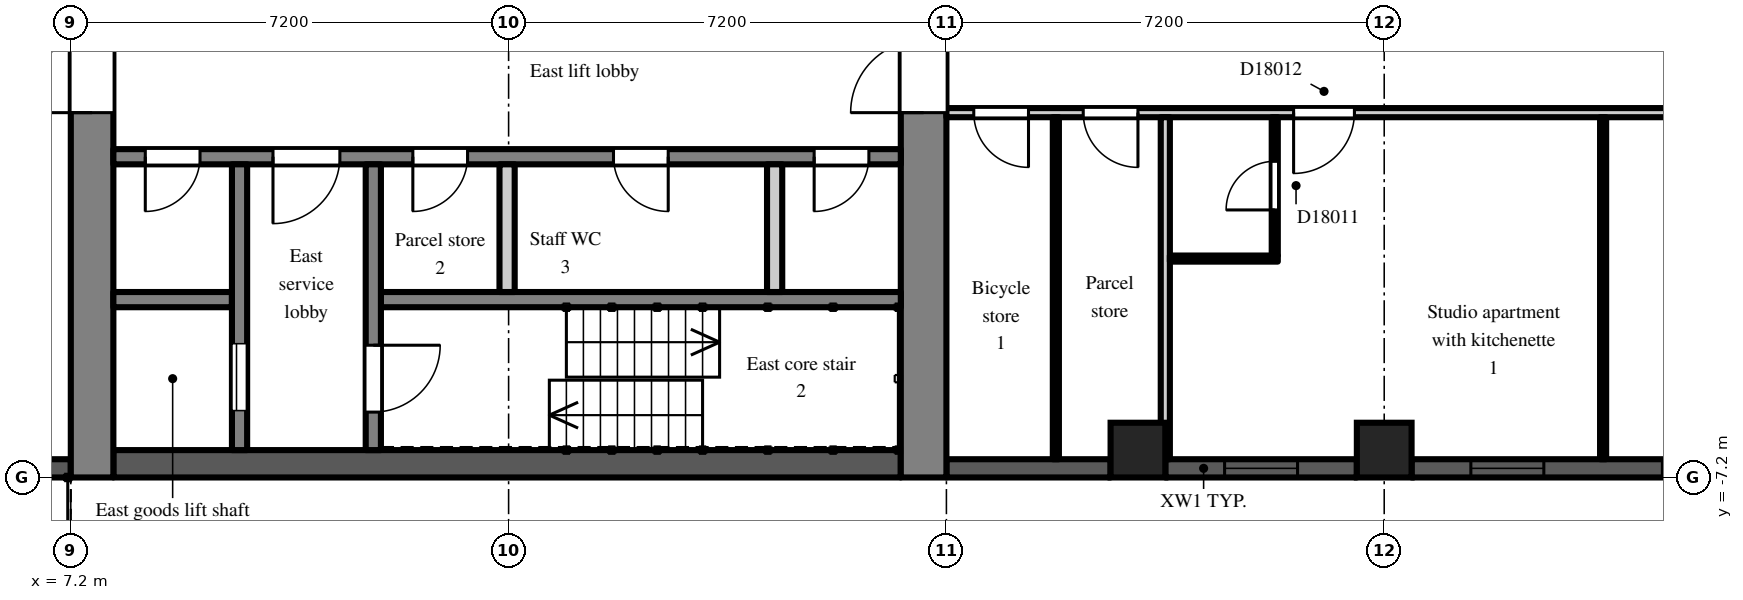
"""IFC4 building model, lengths in metres.
Left out: names, types, materials, properties, quantities, classifications, styles, units other than length and angle.
Written with IfcOpenShell. Run it as: python <this file> out.ifc"""

import sys

from ifc_helpers import new_model, si_unit, direction, frame, frame_2d, origin, origin_2d, place, context, subcontext, project, spatial, rectangle, extrude, element, fill, save


model = new_model("IFC4")
c1 = context("Model", 3, precision=1e-05, world=origin(), true_north=direction((0.0, 1.0)))
c2 = subcontext(c1, "Body", "Model", "MODEL_VIEW")
j1 = project(units=[si_unit("LENGTHUNIT", "METRE"), si_unit("PLANEANGLEUNIT", "RADIAN")], contexts=[c1])
p1 = place(None, origin())
s1 = spatial("IfcSite", under=j1, at=p1, CompositionType="ELEMENT")
p2 = place(p1, origin())
s2 = spatial("IfcBuilding", under=s1, at=p2, CompositionType="ELEMENT")
p3 = place(p2, frame((0.0, 0.0, 123.3)))
s3 = spatial("IfcBuildingStorey", under=s2, at=p3, CompositionType="ELEMENT", Elevation=123.3)
for number, where, z_axis, x_axis in (
    (1, (24.75, -6.75, 0.0), (0.0, 0.0, 1.0), (1.0, 0.0, 0.0)),
    (2, (28.8, -6.75, 0.0), (0.0, 0.0, 1.0), (1.0, 0.0, 0.0)),
):
    element("IfcColumn", number, at=place(p3, frame(where, z_axis=z_axis, x_axis=x_axis)), inside=s3, PredefinedType="COLUMN", context=c2, shape_type="SweptSolid", body=[
        extrude(rectangle(XDim=0.9, YDim=0.9, at=origin_2d()), origin(), (0.0, 0.0, 1.0), 3.0),
    ])
p4 = place(p3, frame((21.6, -7.05, 0.0), z_axis=(0.0, 0.0, 1.0), x_axis=(1.0, 0.0, 0.0)))
e3 = element("IfcWall", 3, at=p4, inside=s3, PredefinedType="SOLIDWALL", context=c2, shape_type="SweptSolid", body=[
    extrude(rectangle(XDim=2.7, YDim=0.3, at=frame_2d((1.35, 0.0))), origin(), (0.0, 0.0, 1.0), 2.2),
])
p5 = place(p3, frame((25.2, -7.05, 0.0), z_axis=(0.0, 0.0, 1.0), x_axis=(1.0, 0.0, 0.0)))
e4 = element("IfcWall", 4, at=p5, inside=s3, PredefinedType="SOLIDWALL", context=c2, shape_type="SweptSolid", body=[
    extrude(rectangle(XDim=3.15, YDim=0.3, at=frame_2d((1.575, 0.0))), origin(), (0.0, 0.0, 1.0), 2.2),
])
p6 = place(p5, frame((0.975, 0.0, 0.2)))
e5 = element("IfcOpeningElement", 5, at=p6, cuts=e4, PredefinedType="OPENING", context=c2, shape_type="SweptSolid", body=[
    extrude(rectangle(XDim=1.2, YDim=1.85, at=frame_2d((0.6, 0.925))), frame((0.0, 0.16, 0.0), z_axis=(0.0, -1.0, 0.0), x_axis=(1.0, 0.0, 0.0)), (0.0, 0.0, 1.0), 0.32),
])
p7 = place(p3, frame((29.25, -7.05, 0.0), z_axis=(0.0, 0.0, 1.0), x_axis=(1.0, 0.0, 0.0)))
e6 = element("IfcWall", 6, at=p7, inside=s3, PredefinedType="SOLIDWALL", context=c2, shape_type="SweptSolid", body=[
    extrude(rectangle(XDim=6.3, YDim=0.3, at=frame_2d((3.15, 0.0))), origin(), (0.0, 0.0, 1.0), 2.2),
])
p8 = place(p7, frame((0.975, 0.0, 0.2)))
e7 = element("IfcOpeningElement", 7, at=p8, cuts=e6, PredefinedType="OPENING", context=c2, shape_type="SweptSolid", body=[
    extrude(rectangle(XDim=1.2, YDim=1.85, at=frame_2d((0.6, 0.925))), frame((0.0, 0.16, 0.0), z_axis=(0.0, -1.0, 0.0), x_axis=(1.0, 0.0, 0.0)), (0.0, 0.0, 1.0), 0.32),
])
p9 = place(p7, frame((4.125, 0.0, 0.2)))
e8 = element("IfcOpeningElement", 8, at=p9, cuts=e6, PredefinedType="OPENING", context=c2, shape_type="SweptSolid", body=[
    extrude(rectangle(XDim=1.2, YDim=1.85, at=frame_2d((0.6, 0.925))), frame((0.0, 0.16, 0.0), z_axis=(0.0, -1.0, 0.0), x_axis=(1.0, 0.0, 0.0)), (0.0, 0.0, 1.0), 0.32),
])
p10 = place(p3, frame((4.2, -7.05, 0.0), z_axis=(0.0, 0.0, 1.0), x_axis=(1.0, 0.0, 0.0)))
e9 = element("IfcWall", 9, at=p10, inside=s3, PredefinedType="SOLIDWALL", context=c2, shape_type="SweptSolid", body=[
    extrude(rectangle(XDim=3.0, YDim=0.3, at=frame_2d((1.5, 0.0))), origin(), (0.0, 0.0, 1.0), 2.2),
])
p11 = place(p3, frame((7.55, -7.2, 0.0), z_axis=(0.0, 0.0, 1.0), x_axis=(0.0, 1.0, 0.0)))
e10 = element("IfcWall", 10, at=p11, inside=s3, PredefinedType="SHEAR", context=c2, shape_type="SweptSolid", body=[
    extrude(rectangle(XDim=14.4, YDim=0.7, at=frame_2d((7.2, 0.0))), origin(), (0.0, 0.0, 1.0), 2.6),
])
p12 = place(p11, frame((6.0, 0.0, 0.0)))
e11 = element("IfcOpeningElement", 11, at=p12, cuts=e10, PredefinedType="OPENING", context=c2, shape_type="SweptSolid", body=[
    extrude(rectangle(XDim=2.4, YDim=2.2, at=frame_2d((1.2, 1.1))), frame((0.0, 0.36, 0.0), z_axis=(0.0, -1.0, 0.0), x_axis=(1.0, 0.0, 0.0)), (0.0, 0.0, 1.0), 0.72),
])
p13 = place(p3, frame((21.225, -7.2, 0.0), z_axis=(0.0, 0.0, 1.0), x_axis=(0.0, 1.0, 0.0)))
e12 = element("IfcWall", 12, at=p13, inside=s3, PredefinedType="SHEAR", context=c2, shape_type="SweptSolid", body=[
    extrude(rectangle(XDim=14.4, YDim=0.75, at=frame_2d((7.2, 0.0))), origin(), (0.0, 0.0, 1.0), 2.6),
])
p14 = place(p13, frame((6.0, 0.0, 0.0)))
e13 = element("IfcOpeningElement", 13, at=p14, cuts=e12, PredefinedType="OPENING", context=c2, shape_type="SweptSolid", body=[
    extrude(rectangle(XDim=2.4, YDim=2.2, at=frame_2d((1.2, 1.1))), frame((0.0, 0.385, 0.0), z_axis=(0.0, -1.0, 0.0), x_axis=(1.0, 0.0, 0.0)), (0.0, 0.0, 1.0), 0.77),
])
p15 = place(p3, frame((7.9, -6.975, 0.0), z_axis=(0.0, 0.0, 1.0), x_axis=(1.0, 0.0, 0.0)))
e14 = element("IfcWall", 14, at=p15, inside=s3, PredefinedType="SHEAR", context=c2, shape_type="SweptSolid", body=[
    extrude(rectangle(XDim=12.95, YDim=0.45, at=frame_2d((6.475, 0.0))), origin(), (0.0, 0.0, 1.0), 2.6),
])
p16 = place(p3, frame((7.9, -1.925, 0.0), z_axis=(0.0, 0.0, 1.0), x_axis=(1.0, 0.0, 0.0)))
e15 = element("IfcWall", 15, at=p16, inside=s3, PredefinedType="SHEAR", context=c2, shape_type="SweptSolid", body=[
    extrude(rectangle(XDim=12.95, YDim=0.25, at=frame_2d((6.475, 0.0))), origin(), (0.0, 0.0, 1.0), 2.6),
])
p17 = place(p16, frame((0.525, 0.0, 0.0)))
e16 = element("IfcOpeningElement", 16, at=p17, cuts=e15, PredefinedType="OPENING", context=c2, shape_type="SweptSolid", body=[
    extrude(rectangle(XDim=0.9, YDim=2.1, at=frame_2d((0.45, 1.05))), frame((0.0, 0.135, 0.0), z_axis=(0.0, -1.0, 0.0), x_axis=(1.0, 0.0, 0.0)), (0.0, 0.0, 1.0), 0.27),
])
p18 = place(p16, frame((2.625, 0.0, 0.0)))
e17 = element("IfcOpeningElement", 17, at=p18, cuts=e15, PredefinedType="OPENING", context=c2, shape_type="SweptSolid", body=[
    extrude(rectangle(XDim=1.1, YDim=2.1, at=frame_2d((0.55, 1.05))), frame((0.0, 0.135, 0.0), z_axis=(0.0, -1.0, 0.0), x_axis=(1.0, 0.0, 0.0)), (0.0, 0.0, 1.0), 0.27),
])
p19 = place(p16, frame((4.925, 0.0, 0.0)))
e18 = element("IfcOpeningElement", 18, at=p19, cuts=e15, PredefinedType="OPENING", context=c2, shape_type="SweptSolid", body=[
    extrude(rectangle(XDim=0.9, YDim=2.1, at=frame_2d((0.45, 1.05))), frame((0.0, 0.135, 0.0), z_axis=(0.0, -1.0, 0.0), x_axis=(1.0, 0.0, 0.0)), (0.0, 0.0, 1.0), 0.27),
])
p20 = place(p16, frame((8.225, 0.0, 0.0)))
e19 = element("IfcOpeningElement", 19, at=p20, cuts=e15, PredefinedType="OPENING", context=c2, shape_type="SweptSolid", body=[
    extrude(rectangle(XDim=0.9, YDim=2.1, at=frame_2d((0.45, 1.05))), frame((0.0, 0.135, 0.0), z_axis=(0.0, -1.0, 0.0), x_axis=(1.0, 0.0, 0.0)), (0.0, 0.0, 1.0), 0.27),
])
p21 = place(p16, frame((11.525, 0.0, 0.0)))
e20 = element("IfcOpeningElement", 20, at=p21, cuts=e15, PredefinedType="OPENING", context=c2, shape_type="SweptSolid", body=[
    extrude(rectangle(XDim=0.9, YDim=2.1, at=frame_2d((0.45, 1.05))), frame((0.0, 0.135, 0.0), z_axis=(0.0, -1.0, 0.0), x_axis=(1.0, 0.0, 0.0)), (0.0, 0.0, 1.0), 0.27),
])
p22 = place(p3, frame((7.9, -4.275, 0.0), z_axis=(0.0, 0.0, 1.0), x_axis=(1.0, 0.0, 0.0)))
e21 = element("IfcWall", 21, at=p22, inside=s3, PredefinedType="SHEAR", context=c2, shape_type="SweptSolid", body=[
    extrude(rectangle(XDim=1.95, YDim=0.25, at=frame_2d((0.975, 0.0))), origin(), (0.0, 0.0, 1.0), 2.6),
])
p23 = place(p3, frame((12.3, -4.275, 0.0), z_axis=(0.0, 0.0, 1.0), x_axis=(1.0, 0.0, 0.0)))
e22 = element("IfcWall", 22, at=p23, inside=s3, PredefinedType="SHEAR", context=c2, shape_type="SweptSolid", body=[
    extrude(rectangle(XDim=8.55, YDim=0.25, at=frame_2d((4.275, 0.0))), origin(), (0.0, 0.0, 1.0), 2.6),
])
p24 = place(p3, frame((9.975, -2.05, 0.0), z_axis=(0.0, 0.0, 1.0), x_axis=(0.0, -1.0, 0.0)))
e23 = element("IfcWall", 23, at=p24, inside=s3, PredefinedType="SHEAR", context=c2, shape_type="SweptSolid", body=[
    extrude(rectangle(XDim=4.7, YDim=0.25, at=frame_2d((2.35, 0.0))), origin(), (0.0, 0.0, 1.0), 2.6),
])
p25 = place(p24, frame((2.95, 0.0, 0.0)))
e24 = element("IfcOpeningElement", 24, at=p25, cuts=e23, PredefinedType="OPENING", context=c2, shape_type="SweptSolid", body=[
    extrude(rectangle(XDim=1.1, YDim=2.1, at=frame_2d((0.55, 1.05))), frame((0.0, 0.135, 0.0), z_axis=(0.0, -1.0, 0.0), x_axis=(1.0, 0.0, 0.0)), (0.0, 0.0, 1.0), 0.27),
])
p26 = place(p3, frame((12.175, -2.05, 0.0), z_axis=(0.0, 0.0, 1.0), x_axis=(0.0, -1.0, 0.0)))
e25 = element("IfcWall", 25, at=p26, inside=s3, PredefinedType="SHEAR", context=c2, shape_type="SweptSolid", body=[
    extrude(rectangle(XDim=4.7, YDim=0.25, at=frame_2d((2.35, 0.0))), origin(), (0.0, 0.0, 1.0), 2.6),
])
p27 = place(p26, frame((2.975, 0.0, 0.0)))
e26 = element("IfcOpeningElement", 26, at=p27, cuts=e25, PredefinedType="OPENING", context=c2, shape_type="SweptSolid", body=[
    extrude(rectangle(XDim=1.1, YDim=2.1, at=frame_2d((0.55, 1.05))), frame((0.0, 0.135, 0.0), z_axis=(0.0, -1.0, 0.0), x_axis=(1.0, 0.0, 0.0)), (0.0, 0.0, 1.0), 0.27),
])
for number, where, z_axis, x_axis in (
    (27, (14.375, -2.05, 0.0), (0.0, 0.0, 1.0), (0.0, -1.0, 0.0)),
    (28, (18.775, -2.05, 0.0), (0.0, 0.0, 1.0), (0.0, -1.0, 0.0)),
):
    element("IfcWall", number, at=place(p3, frame(where, z_axis=z_axis, x_axis=x_axis)), inside=s3, PredefinedType="PARTITIONING", context=c2, shape_type="SweptSolid", body=[
        extrude(rectangle(XDim=2.1, YDim=0.25, at=frame_2d((1.05, 0.0))), origin(), (0.0, 0.0, 1.0), 2.6),
    ])
p28 = place(p3, frame((21.6, -1.2, 0.0), z_axis=(0.0, 0.0, 1.0), x_axis=(1.0, 0.0, 0.0)))
e29 = element("IfcWall", 29, at=p28, inside=s3, PredefinedType="PARTITIONING", context=c2, shape_type="SweptSolid", body=[
    extrude(rectangle(XDim=14.9, YDim=0.15, at=frame_2d((7.45, 0.0))), origin(), (0.0, 0.0, 1.0), 2.6),
])
p29 = place(p28, frame((0.45, 0.0, 0.0)))
e30 = element("IfcOpeningElement", 30, at=p29, cuts=e29, PredefinedType="OPENING", context=c2, shape_type="SweptSolid", body=[
    extrude(rectangle(XDim=0.9, YDim=2.1, at=frame_2d((0.45, 1.05))), frame((0.0, 0.085, 0.0), z_axis=(0.0, -1.0, 0.0), x_axis=(1.0, 0.0, 0.0)), (0.0, 0.0, 1.0), 0.17),
])
p30 = place(p28, frame((2.25, 0.0, 0.0)))
e31 = element("IfcOpeningElement", 31, at=p30, cuts=e29, PredefinedType="OPENING", context=c2, shape_type="SweptSolid", body=[
    extrude(rectangle(XDim=0.9, YDim=2.1, at=frame_2d((0.45, 1.05))), frame((0.0, 0.085, 0.0), z_axis=(0.0, -1.0, 0.0), x_axis=(1.0, 0.0, 0.0)), (0.0, 0.0, 1.0), 0.17),
])
p31 = place(p28, frame((5.71, 0.0, 0.0)))
e32 = element("IfcOpeningElement", 32, at=p31, cuts=e29, PredefinedType="OPENING", context=c2, shape_type="SweptSolid", body=[
    extrude(rectangle(XDim=1.0, YDim=2.1, at=frame_2d((0.5, 1.05))), frame((0.0, 0.085, 0.0), z_axis=(0.0, -1.0, 0.0), x_axis=(1.0, 0.0, 0.0)), (0.0, 0.0, 1.0), 0.17),
])
p32 = place(p28, frame((11.95, 0.0, 0.0)))
e33 = element("IfcOpeningElement", 33, at=p32, cuts=e29, PredefinedType="OPENING", context=c2, shape_type="SweptSolid", body=[
    extrude(rectangle(XDim=1.8, YDim=2.1, at=frame_2d((0.9, 1.05))), frame((0.0, 0.085, 0.0), z_axis=(0.0, -1.0, 0.0), x_axis=(1.0, 0.0, 0.0)), (0.0, 0.0, 1.0), 0.17),
])
p33 = place(p3, frame((23.4, -6.9, 0.0), z_axis=(0.0, 0.0, 1.0), x_axis=(0.0, 1.0, 0.0)))
e34 = element("IfcWall", 34, at=p33, inside=s3, PredefinedType="PARTITIONING", context=c2, shape_type="SweptSolid", body=[
    extrude(rectangle(XDim=5.625, YDim=0.1, at=frame_2d((2.812, 0.0))), origin(), (0.0, 0.0, 1.0), 2.6),
])
p34 = place(p3, frame((25.2, -6.9, 0.0), z_axis=(0.0, 0.0, 1.0), x_axis=(0.0, 1.0, 0.0)))
e35 = element("IfcWall", 35, at=p34, inside=s3, PredefinedType="PARTITIONING", context=c2, shape_type="SweptSolid", body=[
    extrude(rectangle(XDim=5.625, YDim=0.15, at=frame_2d((2.812, 0.0))), origin(), (0.0, 0.0, 1.0), 2.6),
])
p35 = place(p3, frame((25.275, -3.6, 0.0), z_axis=(0.0, 0.0, 1.0), x_axis=(1.0, 0.0, 0.0)))
e36 = element("IfcWall", 36, at=p35, inside=s3, PredefinedType="PARTITIONING", context=c2, shape_type="SweptSolid", body=[
    extrude(rectangle(XDim=1.775, YDim=0.1, at=frame_2d((0.888, 0.0))), origin(), (0.0, 0.0, 1.0), 2.6),
])
p36 = place(p3, frame((27.0, -3.55, 0.0), z_axis=(0.0, 0.0, 1.0), x_axis=(0.0, 1.0, 0.0)))
e37 = element("IfcWall", 37, at=p36, inside=s3, PredefinedType="PARTITIONING", context=c2, shape_type="SweptSolid", body=[
    extrude(rectangle(XDim=2.275, YDim=0.1, at=frame_2d((1.138, 0.0))), origin(), (0.0, 0.0, 1.0), 2.6),
])
p37 = place(p36, frame((0.75, 0.0, 0.0)))
e38 = element("IfcOpeningElement", 38, at=p37, cuts=e37, PredefinedType="OPENING", context=c2, shape_type="SweptSolid", body=[
    extrude(rectangle(XDim=0.8, YDim=2.1, at=frame_2d((0.4, 1.05))), frame((0.0, 0.06, 0.0), z_axis=(0.0, -1.0, 0.0), x_axis=(1.0, 0.0, 0.0)), (0.0, 0.0, 1.0), 0.12),
])
p38 = place(p3, frame((32.4, -6.9, 0.0), z_axis=(0.0, 0.0, 1.0), x_axis=(0.0, 1.0, 0.0)))
e39 = element("IfcWall", 39, at=p38, inside=s3, PredefinedType="PARTITIONING", context=c2, shape_type="SweptSolid", body=[
    extrude(rectangle(XDim=5.625, YDim=0.1, at=frame_2d((2.812, 0.0))), origin(), (0.0, 0.0, 1.0), 2.6),
])
p39 = place(p6, origin())
e40 = element("IfcWindow", 40, at=p39, inside=s3, PartitioningType="SINGLE_PANEL", PredefinedType="WINDOW", context=c2, shape_type="SweptSolid", body=[
    extrude(rectangle(XDim=1.2, YDim=1.85, at=frame_2d((0.6, 0.925))), frame((0.0, 0.03, 0.0), z_axis=(0.0, -1.0, 0.0), x_axis=(1.0, 0.0, 0.0)), (0.0, 0.0, 1.0), 0.06),
])
fill(e5, e40)
p40 = place(p8, origin())
e41 = element("IfcWindow", 41, at=p40, inside=s3, PartitioningType="SINGLE_PANEL", PredefinedType="WINDOW", context=c2, shape_type="SweptSolid", body=[
    extrude(rectangle(XDim=1.2, YDim=1.85, at=frame_2d((0.6, 0.925))), frame((0.0, 0.03, 0.0), z_axis=(0.0, -1.0, 0.0), x_axis=(1.0, 0.0, 0.0)), (0.0, 0.0, 1.0), 0.06),
])
fill(e7, e41)
p41 = place(p9, origin())
e42 = element("IfcWindow", 42, at=p41, inside=s3, PartitioningType="SINGLE_PANEL", PredefinedType="WINDOW", context=c2, shape_type="SweptSolid", body=[
    extrude(rectangle(XDim=1.2, YDim=1.85, at=frame_2d((0.6, 0.925))), frame((0.0, 0.03, 0.0), z_axis=(0.0, -1.0, 0.0), x_axis=(1.0, 0.0, 0.0)), (0.0, 0.0, 1.0), 0.06),
])
fill(e8, e42)
p42 = place(p25, origin())
e43 = element("IfcDoor", 43, at=p42, inside=s3, OperationType="SLIDING_TO_LEFT", PredefinedType="DOOR", context=c2, shape_type="SweptSolid", body=[
    extrude(rectangle(XDim=1.1, YDim=2.1, at=frame_2d((0.55, 1.05))), frame((0.0, 0.025, 0.0), z_axis=(0.0, -1.0, 0.0), x_axis=(1.0, 0.0, 0.0)), (0.0, 0.0, 1.0), 0.05),
])
fill(e24, e43)
p43 = place(p27, origin())
e44 = element("IfcDoor", 44, at=p43, inside=s3, OperationType="SINGLE_SWING_LEFT", PredefinedType="DOOR", context=c2, shape_type="SweptSolid", body=[
    extrude(rectangle(XDim=1.1, YDim=2.1, at=frame_2d((0.55, 1.05))), frame((0.0, 0.025, 0.0), z_axis=(0.0, -1.0, 0.0), x_axis=(1.0, 0.0, 0.0)), (0.0, 0.0, 1.0), 0.05),
])
fill(e26, e44)
p44 = place(p17, frame((0.9, 0.0, 0.0), z_axis=(0.0, 0.0, 1.0), x_axis=(-1.0, 0.0, 0.0)))
e45 = element("IfcDoor", 45, at=p44, inside=s3, OperationType="SINGLE_SWING_RIGHT", PredefinedType="DOOR", context=c2, shape_type="SweptSolid", body=[
    extrude(rectangle(XDim=0.9, YDim=2.1, at=frame_2d((0.45, 1.05))), frame((0.0, 0.025, 0.0), z_axis=(0.0, -1.0, 0.0), x_axis=(1.0, 0.0, 0.0)), (0.0, 0.0, 1.0), 0.05),
])
fill(e16, e45)
p45 = place(p18, frame((1.1, 0.0, 0.0), z_axis=(0.0, 0.0, 1.0), x_axis=(-1.0, 0.0, 0.0)))
e46 = element("IfcDoor", 46, at=p45, inside=s3, OperationType="SINGLE_SWING_RIGHT", PredefinedType="DOOR", context=c2, shape_type="SweptSolid", body=[
    extrude(rectangle(XDim=1.1, YDim=2.1, at=frame_2d((0.55, 1.05))), frame((0.0, 0.025, 0.0), z_axis=(0.0, -1.0, 0.0), x_axis=(1.0, 0.0, 0.0)), (0.0, 0.0, 1.0), 0.05),
])
fill(e17, e46)
p46 = place(p12, origin())
e47 = element("IfcDoor", 47, at=p46, inside=s3, OperationType="DOUBLE_DOOR_DOUBLE_SWING", PredefinedType="DOOR", context=c2, shape_type="SweptSolid", body=[
    extrude(rectangle(XDim=2.4, YDim=2.2, at=frame_2d((1.2, 1.1))), frame((0.0, 0.025, 0.0), z_axis=(0.0, -1.0, 0.0), x_axis=(1.0, 0.0, 0.0)), (0.0, 0.0, 1.0), 0.05),
])
fill(e11, e47)
p47 = place(p14, origin())
e48 = element("IfcDoor", 48, at=p47, inside=s3, OperationType="DOUBLE_DOOR_DOUBLE_SWING", PredefinedType="DOOR", context=c2, shape_type="SweptSolid", body=[
    extrude(rectangle(XDim=2.4, YDim=2.2, at=frame_2d((1.2, 1.1))), frame((0.0, 0.025, 0.0), z_axis=(0.0, -1.0, 0.0), x_axis=(1.0, 0.0, 0.0)), (0.0, 0.0, 1.0), 0.05),
])
fill(e13, e48)
p48 = place(p19, frame((0.9, 0.0, 0.0), z_axis=(0.0, 0.0, 1.0), x_axis=(-1.0, 0.0, 0.0)))
e49 = element("IfcDoor", 49, at=p48, inside=s3, OperationType="SINGLE_SWING_RIGHT", PredefinedType="DOOR", context=c2, shape_type="SweptSolid", body=[
    extrude(rectangle(XDim=0.9, YDim=2.1, at=frame_2d((0.45, 1.05))), frame((0.0, 0.025, 0.0), z_axis=(0.0, -1.0, 0.0), x_axis=(1.0, 0.0, 0.0)), (0.0, 0.0, 1.0), 0.05),
])
fill(e18, e49)
p49 = place(p20, frame((0.9, 0.0, 0.0), z_axis=(0.0, 0.0, 1.0), x_axis=(-1.0, 0.0, 0.0)))
e50 = element("IfcDoor", 50, at=p49, inside=s3, OperationType="SINGLE_SWING_LEFT", PredefinedType="DOOR", context=c2, shape_type="SweptSolid", body=[
    extrude(rectangle(XDim=0.9, YDim=2.1, at=frame_2d((0.45, 1.05))), frame((0.0, 0.025, 0.0), z_axis=(0.0, -1.0, 0.0), x_axis=(1.0, 0.0, 0.0)), (0.0, 0.0, 1.0), 0.05),
])
fill(e19, e50)
p50 = place(p21, frame((0.9, 0.0, 0.0), z_axis=(0.0, 0.0, 1.0), x_axis=(-1.0, 0.0, 0.0)))
e51 = element("IfcDoor", 51, at=p50, inside=s3, OperationType="SINGLE_SWING_RIGHT", PredefinedType="DOOR", context=c2, shape_type="SweptSolid", body=[
    extrude(rectangle(XDim=0.9, YDim=2.1, at=frame_2d((0.45, 1.05))), frame((0.0, 0.025, 0.0), z_axis=(0.0, -1.0, 0.0), x_axis=(1.0, 0.0, 0.0)), (0.0, 0.0, 1.0), 0.05),
])
fill(e20, e51)
p51 = place(p29, frame((0.9, 0.0, 0.0), z_axis=(0.0, 0.0, 1.0), x_axis=(-1.0, 0.0, 0.0)))
e52 = element("IfcDoor", 52, at=p51, inside=s3, OperationType="SINGLE_SWING_LEFT", PredefinedType="DOOR", context=c2, shape_type="SweptSolid", body=[
    extrude(rectangle(XDim=0.9, YDim=2.1, at=frame_2d((0.45, 1.05))), frame((0.0, 0.025, 0.0), z_axis=(0.0, -1.0, 0.0), x_axis=(1.0, 0.0, 0.0)), (0.0, 0.0, 1.0), 0.05),
])
fill(e30, e52)
p52 = place(p30, frame((0.9, 0.0, 0.0), z_axis=(0.0, 0.0, 1.0), x_axis=(-1.0, 0.0, 0.0)))
e53 = element("IfcDoor", 53, at=p52, inside=s3, OperationType="SINGLE_SWING_LEFT", PredefinedType="DOOR", context=c2, shape_type="SweptSolid", body=[
    extrude(rectangle(XDim=0.9, YDim=2.1, at=frame_2d((0.45, 1.05))), frame((0.0, 0.025, 0.0), z_axis=(0.0, -1.0, 0.0), x_axis=(1.0, 0.0, 0.0)), (0.0, 0.0, 1.0), 0.05),
])
fill(e31, e53)
p53 = place(p37, origin())
e54 = element("IfcDoor", 54, at=p53, inside=s3, OperationType="SINGLE_SWING_LEFT", PredefinedType="DOOR", context=c2, shape_type="SweptSolid", body=[
    extrude(rectangle(XDim=0.8, YDim=2.1, at=frame_2d((0.4, 1.05))), frame((0.0, 0.025, 0.0), z_axis=(0.0, -1.0, 0.0), x_axis=(1.0, 0.0, 0.0)), (0.0, 0.0, 1.0), 0.05),
])
fill(e38, e54)
p54 = place(p31, frame((1.0, 0.0, 0.0), z_axis=(0.0, 0.0, 1.0), x_axis=(-1.0, 0.0, 0.0)))
e55 = element("IfcDoor", 55, at=p54, inside=s3, OperationType="SINGLE_SWING_RIGHT", PredefinedType="DOOR", context=c2, shape_type="SweptSolid", body=[
    extrude(rectangle(XDim=1.0, YDim=2.1, at=frame_2d((0.5, 1.05))), frame((0.0, 0.025, 0.0), z_axis=(0.0, -1.0, 0.0), x_axis=(1.0, 0.0, 0.0)), (0.0, 0.0, 1.0), 0.05),
])
fill(e32, e55)
save(model, sys.argv[1])
